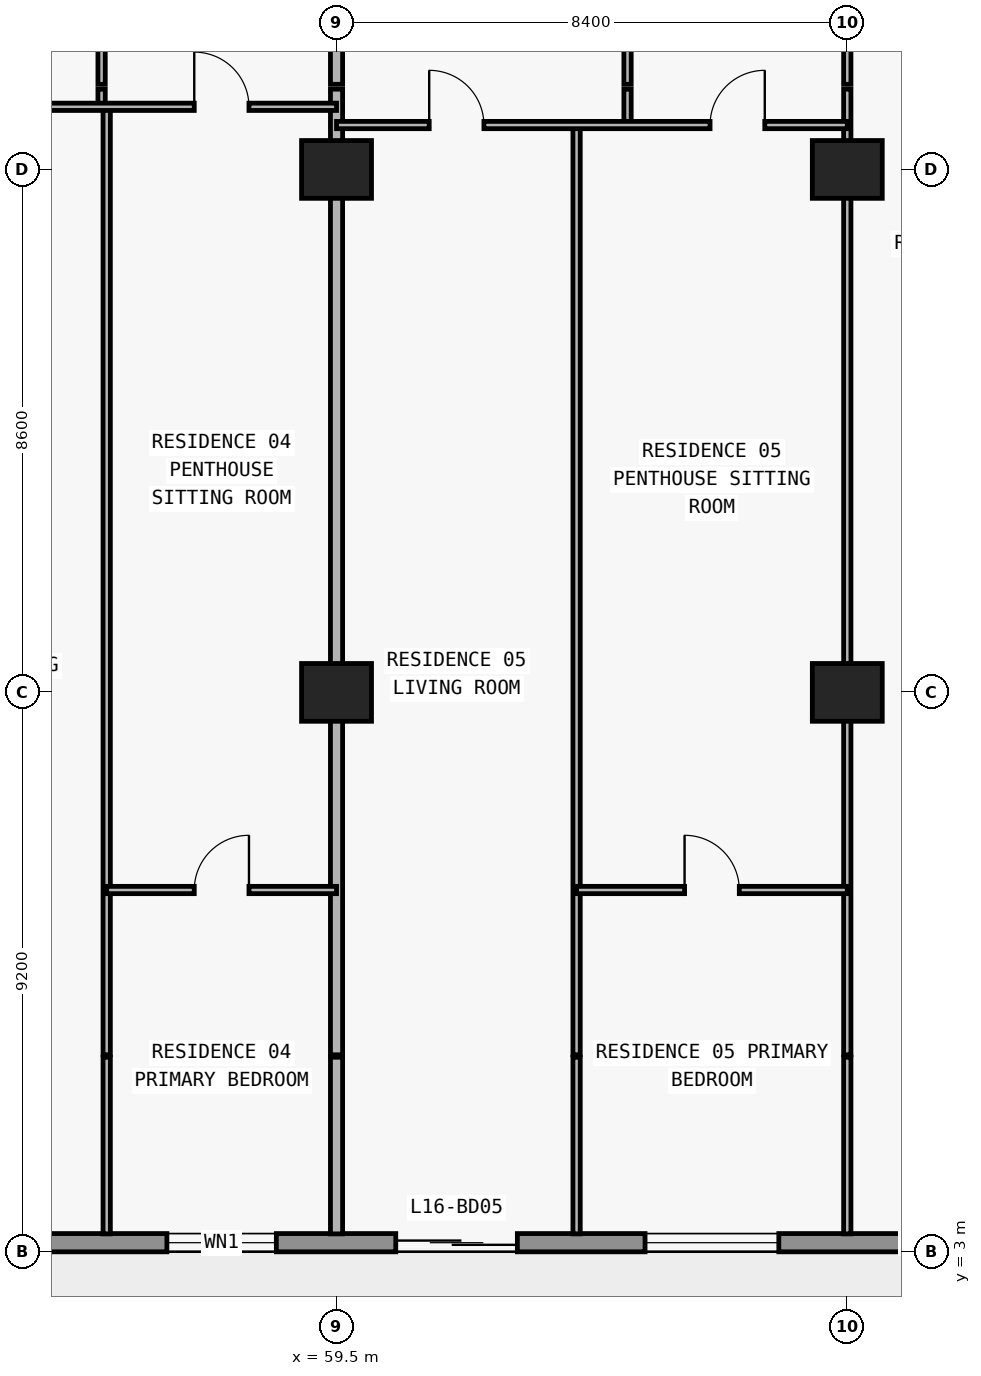
"""IFC4 building model, lengths in metres.
Left out: names, types, materials, properties, quantities, classifications, styles, units other than length and angle.
Written with IfcOpenShell. Run it as: python <this file> out.ifc"""

import sys

from ifc_helpers import new_model, si_unit, direction, frame, frame_2d, origin, origin_2d, place, context, subcontext, project, spatial, rectangle, extrude, element, fill, save


model = new_model("IFC4")
c1 = context("Model", 3, precision=1e-05, world=origin(), true_north=direction((0.0, 1.0)))
c2 = subcontext(c1, "Body", "Model", "MODEL_VIEW")
j1 = project(units=[si_unit("LENGTHUNIT", "METRE"), si_unit("PLANEANGLEUNIT", "RADIAN")], contexts=[c1])
p1 = place(None, origin())
s1 = spatial("IfcSite", under=j1, at=p1, CompositionType="ELEMENT")
p2 = place(p1, origin())
s2 = spatial("IfcBuilding", under=s1, at=p2, CompositionType="ELEMENT")
p3 = place(p2, frame((0.0, 0.0, 63.0)))
s3 = spatial("IfcBuildingStorey", under=s2, at=p3, CompositionType="ELEMENT", Elevation=63.0)
for number, where, z_axis, x_axis in (
    (1, (59.5, 12.2, 0.0), (0.0, 0.0, 1.0), (1.0, 0.0, 0.0)),
    (2, (67.9, 12.2, 0.0), (0.0, 0.0, 1.0), (1.0, 0.0, 0.0)),
    (3, (59.5, 20.8, 0.0), (0.0, 0.0, 1.0), (1.0, 0.0, 0.0)),
    (4, (67.9, 20.8, 0.0), (0.0, 0.0, 1.0), (1.0, 0.0, 0.0)),
):
    element("IfcColumn", number, at=place(p3, frame(where, z_axis=z_axis, x_axis=x_axis)), inside=s3, PredefinedType="COLUMN", context=c2, shape_type="SweptSolid", body=[
        extrude(rectangle(XDim=1.15, YDim=0.95, at=origin_2d()), origin(), (0.0, 0.0, 1.0), 3.05),
    ])
p4 = place(p3, frame((72.7, 3.15, 0.0), z_axis=(0.0, 0.0, 1.0), x_axis=(-1.0, 0.0, 0.0)))
e5 = element("IfcWall", 5, at=p4, inside=s3, PredefinedType="STANDARD", context=c2, shape_type="SweptSolid", body=[
    extrude(rectangle(XDim=67.6, YDim=0.3, at=frame_2d((33.8, 0.0))), origin(), (0.0, 0.0, 1.0), 3.05),
])
p5 = place(p4, frame((59.89, 0.0, 0.0)))
e6 = element("IfcOpeningElement", 6, at=p5, cuts=e5, PredefinedType="OPENING", context=c2, shape_type="SweptSolid", body=[
    extrude(rectangle(XDim=2.0, YDim=2.3, at=frame_2d((1.0, 1.15))), frame((0.0, 0.16, 0.0), z_axis=(0.0, -1.0, 0.0), x_axis=(1.0, 0.0, 0.0)), (0.0, 0.0, 1.0), 0.32),
])
p6 = place(p4, frame((55.21, 0.0, 0.65)))
e7 = element("IfcOpeningElement", 7, at=p6, cuts=e5, PredefinedType="OPENING", context=c2, shape_type="SweptSolid", body=[
    extrude(rectangle(XDim=2.6, YDim=1.85, at=frame_2d((1.3, 0.925))), frame((0.0, 0.16, 0.0), z_axis=(0.0, -1.0, 0.0), x_axis=(1.0, 0.0, 0.0)), (0.0, 0.0, 1.0), 0.32),
])
p7 = place(p4, frame((49.1, 0.0, 0.85)))
e8 = element("IfcOpeningElement", 8, at=p7, cuts=e5, PredefinedType="OPENING", context=c2, shape_type="SweptSolid", body=[
    extrude(rectangle(XDim=2.2, YDim=1.55, at=frame_2d((1.1, 0.775))), frame((0.0, 0.16, 0.0), z_axis=(0.0, -1.0, 0.0), x_axis=(1.0, 0.0, 0.0)), (0.0, 0.0, 1.0), 0.32),
])
p8 = place(p4, frame((43.09, 0.0, 0.0)))
e9 = element("IfcOpeningElement", 9, at=p8, cuts=e5, PredefinedType="OPENING", context=c2, shape_type="SweptSolid", body=[
    extrude(rectangle(XDim=2.0, YDim=2.3, at=frame_2d((1.0, 1.15))), frame((0.0, 0.16, 0.0), z_axis=(0.0, -1.0, 0.0), x_axis=(1.0, 0.0, 0.0)), (0.0, 0.0, 1.0), 0.32),
])
p9 = place(p4, frame((38.41, 0.0, 0.65)))
e10 = element("IfcOpeningElement", 10, at=p9, cuts=e5, PredefinedType="OPENING", context=c2, shape_type="SweptSolid", body=[
    extrude(rectangle(XDim=2.6, YDim=1.85, at=frame_2d((1.3, 0.925))), frame((0.0, 0.16, 0.0), z_axis=(0.0, -1.0, 0.0), x_axis=(1.0, 0.0, 0.0)), (0.0, 0.0, 1.0), 0.32),
])
p10 = place(p4, frame((32.7, 0.0, 0.85)))
e11 = element("IfcOpeningElement", 11, at=p10, cuts=e5, PredefinedType="OPENING", context=c2, shape_type="SweptSolid", body=[
    extrude(rectangle(XDim=2.2, YDim=1.55, at=frame_2d((1.1, 0.775))), frame((0.0, 0.16, 0.0), z_axis=(0.0, -1.0, 0.0), x_axis=(1.0, 0.0, 0.0)), (0.0, 0.0, 1.0), 0.32),
])
p11 = place(p4, frame((27.026, 0.0, 0.0)))
e12 = element("IfcOpeningElement", 12, at=p11, cuts=e5, PredefinedType="OPENING", context=c2, shape_type="SweptSolid", body=[
    extrude(rectangle(XDim=2.0, YDim=2.3, at=frame_2d((1.0, 1.15))), frame((0.0, 0.16, 0.0), z_axis=(0.0, -1.0, 0.0), x_axis=(1.0, 0.0, 0.0)), (0.0, 0.0, 1.0), 0.32),
])
p12 = place(p4, frame((22.726, 0.0, 0.85)))
e13 = element("IfcOpeningElement", 13, at=p12, cuts=e5, PredefinedType="OPENING", context=c2, shape_type="SweptSolid", body=[
    extrude(rectangle(XDim=2.2, YDim=1.55, at=frame_2d((1.1, 0.775))), frame((0.0, 0.16, 0.0), z_axis=(0.0, -1.0, 0.0), x_axis=(1.0, 0.0, 0.0)), (0.0, 0.0, 1.0), 0.32),
])
p13 = place(p4, frame((18.29, 0.0, 0.0)))
e14 = element("IfcOpeningElement", 14, at=p13, cuts=e5, PredefinedType="OPENING", context=c2, shape_type="SweptSolid", body=[
    extrude(rectangle(XDim=2.0, YDim=2.3, at=frame_2d((1.0, 1.15))), frame((0.0, 0.16, 0.0), z_axis=(0.0, -1.0, 0.0), x_axis=(1.0, 0.0, 0.0)), (0.0, 0.0, 1.0), 0.32),
])
p14 = place(p4, frame((14.19, 0.0, 0.85)))
e15 = element("IfcOpeningElement", 15, at=p14, cuts=e5, PredefinedType="OPENING", context=c2, shape_type="SweptSolid", body=[
    extrude(rectangle(XDim=1.8, YDim=1.55, at=frame_2d((0.9, 0.775))), frame((0.0, 0.16, 0.0), z_axis=(0.0, -1.0, 0.0), x_axis=(1.0, 0.0, 0.0)), (0.0, 0.0, 1.0), 0.32),
])
p15 = place(p4, frame((10.226, 0.0, 0.0)))
e16 = element("IfcOpeningElement", 16, at=p15, cuts=e5, PredefinedType="OPENING", context=c2, shape_type="SweptSolid", body=[
    extrude(rectangle(XDim=2.0, YDim=2.3, at=frame_2d((1.0, 1.15))), frame((0.0, 0.16, 0.0), z_axis=(0.0, -1.0, 0.0), x_axis=(1.0, 0.0, 0.0)), (0.0, 0.0, 1.0), 0.32),
])
p16 = place(p4, frame((5.926, 0.0, 0.85)))
e17 = element("IfcOpeningElement", 17, at=p16, cuts=e5, PredefinedType="OPENING", context=c2, shape_type="SweptSolid", body=[
    extrude(rectangle(XDim=2.2, YDim=1.55, at=frame_2d((1.1, 0.775))), frame((0.0, 0.16, 0.0), z_axis=(0.0, -1.0, 0.0), x_axis=(1.0, 0.0, 0.0)), (0.0, 0.0, 1.0), 0.32),
])
p17 = place(p3, frame((55.636, 21.83, 0.0), z_axis=(0.0, 0.0, 1.0), x_axis=(0.0, 1.0, 0.0)))
e18 = element("IfcWall", 18, at=p17, inside=s3, PredefinedType="PARTITIONING", context=c2, shape_type="SweptSolid", body=[
    extrude(rectangle(XDim=0.29, YDim=0.12, at=frame_2d((0.145, 0.0))), origin(), (0.0, 0.0, 1.0), 3.05),
])
p18 = place(p3, frame((55.636, 22.2, 0.0), z_axis=(0.0, 0.0, 1.0), x_axis=(0.0, 1.0, 0.0)))
e19 = element("IfcWall", 19, at=p18, inside=s3, PredefinedType="PARTITIONING", context=c2, shape_type="SweptSolid", body=[
    extrude(rectangle(XDim=4.38, YDim=0.12, at=frame_2d((2.19, 0.0))), origin(), (0.0, 0.0, 1.0), 3.05),
])
p19 = place(p18, frame((1.74, 0.0, 0.0)))
e20 = element("IfcOpeningElement", 20, at=p19, cuts=e19, PredefinedType="OPENING", context=c2, shape_type="SweptSolid", body=[
    extrude(rectangle(XDim=0.9, YDim=2.15, at=frame_2d((0.45, 1.075))), frame((0.0, 0.07, 0.0), z_axis=(0.0, -1.0, 0.0), x_axis=(1.0, 0.0, 0.0)), (0.0, 0.0, 1.0), 0.14),
])
p20 = place(p3, frame((55.72, 3.295, 0.0), z_axis=(0.0, 0.0, 1.0), x_axis=(0.0, 1.0, 0.0)))
e21 = element("IfcWall", 21, at=p20, inside=s3, PredefinedType="PARTITIONING", context=c2, shape_type="SweptSolid", body=[
    extrude(rectangle(XDim=2.905, YDim=0.12, at=frame_2d((1.453, 0.0))), origin(), (0.0, 0.0, 1.0), 3.05),
])
p21 = place(p3, frame((55.72, 6.24, 0.0), z_axis=(0.0, 0.0, 1.0), x_axis=(0.0, 1.0, 0.0)))
e22 = element("IfcWall", 22, at=p21, inside=s3, PredefinedType="PARTITIONING", context=c2, shape_type="SweptSolid", body=[
    extrude(rectangle(XDim=15.585, YDim=0.12, at=frame_2d((7.792, 0.0))), origin(), (0.0, 0.0, 1.0), 3.05),
])
p22 = place(p3, frame((59.5, 3.295, 0.0), z_axis=(0.0, 0.0, 1.0), x_axis=(0.0, 1.0, 0.0)))
e23 = element("IfcWall", 23, at=p22, inside=s3, PredefinedType="PARTITIONING", context=c2, shape_type="SweptSolid", body=[
    extrude(rectangle(XDim=2.905, YDim=0.2, at=frame_2d((1.453, 0.0))), origin(), (0.0, 0.0, 1.0), 3.05),
])
p23 = place(p3, frame((59.5, 6.24, 0.0), z_axis=(0.0, 0.0, 1.0), x_axis=(0.0, 1.0, 0.0)))
e24 = element("IfcWall", 24, at=p23, inside=s3, PredefinedType="PARTITIONING", context=c2, shape_type="SweptSolid", body=[
    extrude(rectangle(XDim=15.88, YDim=0.2, at=frame_2d((7.94, 0.0))), origin(), (0.0, 0.0, 1.0), 2.11),
])
p24 = place(p3, frame((59.5, 22.2, 0.0), z_axis=(0.0, 0.0, 1.0), x_axis=(0.0, 1.0, 0.0)))
e25 = element("IfcWall", 25, at=p24, inside=s3, PredefinedType="PARTITIONING", context=c2, shape_type="SweptSolid", body=[
    extrude(rectangle(XDim=4.38, YDim=0.2, at=frame_2d((2.19, 0.0))), origin(), (0.0, 0.0, 1.0), 2.11),
])
p25 = place(p3, frame((63.448, 3.295, 0.0), z_axis=(0.0, 0.0, 1.0), x_axis=(0.0, 1.0, 0.0)))
e26 = element("IfcWall", 26, at=p25, inside=s3, PredefinedType="PARTITIONING", context=c2, shape_type="SweptSolid", body=[
    extrude(rectangle(XDim=2.905, YDim=0.12, at=frame_2d((1.453, 0.0))), origin(), (0.0, 0.0, 1.0), 3.05),
])
p26 = place(p3, frame((63.448, 6.24, 0.0), z_axis=(0.0, 0.0, 1.0), x_axis=(0.0, 1.0, 0.0)))
e27 = element("IfcWall", 27, at=p26, inside=s3, PredefinedType="PARTITIONING", context=c2, shape_type="SweptSolid", body=[
    extrude(rectangle(XDim=15.29, YDim=0.12, at=frame_2d((7.645, 0.0))), origin(), (0.0, 0.0, 1.0), 3.05),
])
p27 = place(p3, frame((64.286, 21.53, 0.0), z_axis=(0.0, 0.0, 1.0), x_axis=(0.0, 1.0, 0.0)))
e28 = element("IfcWall", 28, at=p27, inside=s3, PredefinedType="PARTITIONING", context=c2, shape_type="SweptSolid", body=[
    extrude(rectangle(XDim=0.59, YDim=0.12, at=frame_2d((0.295, 0.0))), origin(), (0.0, 0.0, 1.0), 3.05),
])
p28 = place(p3, frame((64.286, 22.2, 0.0), z_axis=(0.0, 0.0, 1.0), x_axis=(0.0, 1.0, 0.0)))
e29 = element("IfcWall", 29, at=p28, inside=s3, PredefinedType="PARTITIONING", context=c2, shape_type="SweptSolid", body=[
    extrude(rectangle(XDim=4.38, YDim=0.12, at=frame_2d((2.19, 0.0))), origin(), (0.0, 0.0, 1.0), 3.05),
])
p29 = place(p28, frame((1.74, 0.0, 0.0)))
e30 = element("IfcOpeningElement", 30, at=p29, cuts=e29, PredefinedType="OPENING", context=c2, shape_type="SweptSolid", body=[
    extrude(rectangle(XDim=0.9, YDim=2.15, at=frame_2d((0.45, 1.075))), frame((0.0, 0.07, 0.0), z_axis=(0.0, -1.0, 0.0), x_axis=(1.0, 0.0, 0.0)), (0.0, 0.0, 1.0), 0.14),
])
p30 = place(p3, frame((67.9, 3.295, 0.0), z_axis=(0.0, 0.0, 1.0), x_axis=(0.0, 1.0, 0.0)))
e31 = element("IfcWall", 31, at=p30, inside=s3, PredefinedType="PARTITIONING", context=c2, shape_type="SweptSolid", body=[
    extrude(rectangle(XDim=2.905, YDim=0.12, at=frame_2d((1.453, 0.0))), origin(), (0.0, 0.0, 1.0), 3.05),
])
p31 = place(p3, frame((67.9, 6.24, 0.0), z_axis=(0.0, 0.0, 1.0), x_axis=(0.0, 1.0, 0.0)))
e32 = element("IfcWall", 32, at=p31, inside=s3, PredefinedType="PARTITIONING", context=c2, shape_type="SweptSolid", body=[
    extrude(rectangle(XDim=15.88, YDim=0.12, at=frame_2d((7.94, 0.0))), origin(), (0.0, 0.0, 1.0), 2.11),
])
p32 = place(p3, frame((67.9, 22.2, 0.0), z_axis=(0.0, 0.0, 1.0), x_axis=(0.0, 1.0, 0.0)))
e33 = element("IfcWall", 33, at=p32, inside=s3, PredefinedType="PARTITIONING", context=c2, shape_type="SweptSolid", body=[
    extrude(rectangle(XDim=4.38, YDim=0.12, at=frame_2d((2.19, 0.0))), origin(), (0.0, 0.0, 1.0), 2.11),
])
p33 = place(p32, frame((1.74, 0.0, 0.0)))
e34 = element("IfcOpeningElement", 34, at=p33, cuts=e33, PredefinedType="OPENING", context=c2, shape_type="SweptSolid", body=[
    extrude(rectangle(XDim=0.9, YDim=2.06, at=frame_2d((0.45, 1.03))), frame((0.0, 0.07, 0.0), z_axis=(0.0, -1.0, 0.0), x_axis=(1.0, 0.0, 0.0)), (0.0, 0.0, 1.0), 0.14),
])
p34 = place(p3, frame((55.72, 8.95, 0.0), z_axis=(0.0, 0.0, 1.0), x_axis=(1.0, 0.0, 0.0)))
e35 = element("IfcWall", 35, at=p34, inside=s3, PredefinedType="PARTITIONING", context=c2, shape_type="SweptSolid", body=[
    extrude(rectangle(XDim=3.78, YDim=0.12, at=frame_2d((1.89, 0.0))), origin(), (0.0, 0.0, 1.0), 3.05),
])
p35 = place(p34, frame((1.44, 0.0, 0.0)))
e36 = element("IfcOpeningElement", 36, at=p35, cuts=e35, PredefinedType="OPENING", context=c2, shape_type="SweptSolid", body=[
    extrude(rectangle(XDim=0.9, YDim=2.15, at=frame_2d((0.45, 1.075))), frame((0.0, 0.07, 0.0), z_axis=(0.0, -1.0, 0.0), x_axis=(1.0, 0.0, 0.0)), (0.0, 0.0, 1.0), 0.14),
])
p36 = place(p3, frame((63.448, 8.95, 0.0), z_axis=(0.0, 0.0, 1.0), x_axis=(1.0, 0.0, 0.0)))
e37 = element("IfcWall", 37, at=p36, inside=s3, PredefinedType="PARTITIONING", context=c2, shape_type="SweptSolid", body=[
    extrude(rectangle(XDim=4.452, YDim=0.12, at=frame_2d((2.226, 0.0))), origin(), (0.0, 0.0, 1.0), 3.05),
])
p37 = place(p36, frame((1.776, 0.0, 0.0)))
e38 = element("IfcOpeningElement", 38, at=p37, cuts=e37, PredefinedType="OPENING", context=c2, shape_type="SweptSolid", body=[
    extrude(rectangle(XDim=0.9, YDim=2.15, at=frame_2d((0.45, 1.075))), frame((0.0, 0.07, 0.0), z_axis=(0.0, -1.0, 0.0), x_axis=(1.0, 0.0, 0.0)), (0.0, 0.0, 1.0), 0.14),
])
p38 = place(p3, frame((59.5, 21.53, 0.0), z_axis=(0.0, 0.0, 1.0), x_axis=(1.0, 0.0, 0.0)))
e39 = element("IfcWall", 39, at=p38, inside=s3, PredefinedType="PARTITIONING", context=c2, shape_type="SweptSolid", body=[
    extrude(rectangle(XDim=8.4, YDim=0.12, at=frame_2d((4.2, 0.0))), origin(), (0.0, 0.0, 1.0), 3.05),
])
p39 = place(p38, frame((1.524, 0.0, 0.0)))
e40 = element("IfcOpeningElement", 40, at=p39, cuts=e39, PredefinedType="OPENING", context=c2, shape_type="SweptSolid", body=[
    extrude(rectangle(XDim=0.9, YDim=2.15, at=frame_2d((0.45, 1.075))), frame((0.0, 0.07, 0.0), z_axis=(0.0, -1.0, 0.0), x_axis=(1.0, 0.0, 0.0)), (0.0, 0.0, 1.0), 0.14),
])
p40 = place(p38, frame((6.143, 0.0, 0.0)))
e41 = element("IfcOpeningElement", 41, at=p40, cuts=e39, PredefinedType="OPENING", context=c2, shape_type="SweptSolid", body=[
    extrude(rectangle(XDim=0.9, YDim=2.15, at=frame_2d((0.45, 1.075))), frame((0.0, 0.07, 0.0), z_axis=(0.0, -1.0, 0.0), x_axis=(1.0, 0.0, 0.0)), (0.0, 0.0, 1.0), 0.14),
])
p41 = place(p3, frame((51.37, 21.83, 0.0), z_axis=(0.0, 0.0, 1.0), x_axis=(1.0, 0.0, 0.0)))
e42 = element("IfcWall", 42, at=p41, inside=s3, PredefinedType="PARTITIONING", context=c2, shape_type="SweptSolid", body=[
    extrude(rectangle(XDim=8.13, YDim=0.12, at=frame_2d((4.065, 0.0))), origin(), (0.0, 0.0, 1.0), 3.05),
])
p42 = place(p41, frame((1.683, 0.0, 0.0)))
e43 = element("IfcOpeningElement", 43, at=p42, cuts=e42, PredefinedType="OPENING", context=c2, shape_type="SweptSolid", body=[
    extrude(rectangle(XDim=0.9, YDim=2.15, at=frame_2d((0.45, 1.075))), frame((0.0, 0.07, 0.0), z_axis=(0.0, -1.0, 0.0), x_axis=(1.0, 0.0, 0.0)), (0.0, 0.0, 1.0), 0.14),
])
p43 = place(p41, frame((5.79, 0.0, 0.0)))
e44 = element("IfcOpeningElement", 44, at=p43, cuts=e42, PredefinedType="OPENING", context=c2, shape_type="SweptSolid", body=[
    extrude(rectangle(XDim=0.9, YDim=2.15, at=frame_2d((0.45, 1.075))), frame((0.0, 0.07, 0.0), z_axis=(0.0, -1.0, 0.0), x_axis=(1.0, 0.0, 0.0)), (0.0, 0.0, 1.0), 0.14),
])
p44 = place(p14, origin())
e45 = element("IfcWindow", 45, at=p44, inside=s3, PartitioningType="SINGLE_PANEL", PredefinedType="WINDOW", context=c2, shape_type="SweptSolid", body=[
    extrude(rectangle(XDim=1.8, YDim=1.55, at=frame_2d((0.9, 0.775))), frame((0.0, 0.03, 0.0), z_axis=(0.0, -1.0, 0.0), x_axis=(1.0, 0.0, 0.0)), (0.0, 0.0, 1.0), 0.06),
])
fill(e15, e45)
p45 = place(p15, origin())
e46 = element("IfcDoor", 46, at=p45, inside=s3, OperationType="DOUBLE_DOOR_SLIDING", PredefinedType="DOOR", context=c2, shape_type="SweptSolid", body=[
    extrude(rectangle(XDim=2.0, YDim=2.3, at=frame_2d((1.0, 1.15))), frame((0.0, 0.025, 0.0), z_axis=(0.0, -1.0, 0.0), x_axis=(1.0, 0.0, 0.0)), (0.0, 0.0, 1.0), 0.05),
])
fill(e16, e46)
p46 = place(p16, origin())
e47 = element("IfcWindow", 47, at=p46, inside=s3, PartitioningType="SINGLE_PANEL", PredefinedType="WINDOW", context=c2, shape_type="SweptSolid", body=[
    extrude(rectangle(XDim=2.2, YDim=1.55, at=frame_2d((1.1, 0.775))), frame((0.0, 0.03, 0.0), z_axis=(0.0, -1.0, 0.0), x_axis=(1.0, 0.0, 0.0)), (0.0, 0.0, 1.0), 0.06),
])
fill(e17, e47)
p47 = place(p43, origin())
e48 = element("IfcDoor", 48, at=p47, inside=s3, OperationType="SINGLE_SWING_LEFT", PredefinedType="DOOR", context=c2, shape_type="SweptSolid", body=[
    extrude(rectangle(XDim=0.9, YDim=2.15, at=frame_2d((0.45, 1.075))), frame((0.0, 0.025, 0.0), z_axis=(0.0, -1.0, 0.0), x_axis=(1.0, 0.0, 0.0)), (0.0, 0.0, 1.0), 0.05),
])
fill(e44, e48)
p48 = place(p35, origin())
e49 = element("IfcDoor", 49, at=p48, inside=s3, OperationType="SINGLE_SWING_RIGHT", PredefinedType="DOOR", context=c2, shape_type="SweptSolid", body=[
    extrude(rectangle(XDim=0.9, YDim=2.15, at=frame_2d((0.45, 1.075))), frame((0.0, 0.025, 0.0), z_axis=(0.0, -1.0, 0.0), x_axis=(1.0, 0.0, 0.0)), (0.0, 0.0, 1.0), 0.05),
])
fill(e36, e49)
p49 = place(p39, origin())
e50 = element("IfcDoor", 50, at=p49, inside=s3, OperationType="SINGLE_SWING_LEFT", PredefinedType="DOOR", context=c2, shape_type="SweptSolid", body=[
    extrude(rectangle(XDim=0.9, YDim=2.15, at=frame_2d((0.45, 1.075))), frame((0.0, 0.025, 0.0), z_axis=(0.0, -1.0, 0.0), x_axis=(1.0, 0.0, 0.0)), (0.0, 0.0, 1.0), 0.05),
])
fill(e40, e50)
p50 = place(p40, origin())
e51 = element("IfcDoor", 51, at=p50, inside=s3, OperationType="SINGLE_SWING_RIGHT", PredefinedType="DOOR", context=c2, shape_type="SweptSolid", body=[
    extrude(rectangle(XDim=0.9, YDim=2.15, at=frame_2d((0.45, 1.075))), frame((0.0, 0.025, 0.0), z_axis=(0.0, -1.0, 0.0), x_axis=(1.0, 0.0, 0.0)), (0.0, 0.0, 1.0), 0.05),
])
fill(e41, e51)
p51 = place(p37, origin())
e52 = element("IfcDoor", 52, at=p51, inside=s3, OperationType="SINGLE_SWING_LEFT", PredefinedType="DOOR", context=c2, shape_type="SweptSolid", body=[
    extrude(rectangle(XDim=0.9, YDim=2.15, at=frame_2d((0.45, 1.075))), frame((0.0, 0.025, 0.0), z_axis=(0.0, -1.0, 0.0), x_axis=(1.0, 0.0, 0.0)), (0.0, 0.0, 1.0), 0.05),
])
fill(e38, e52)
save(model, sys.argv[1])
